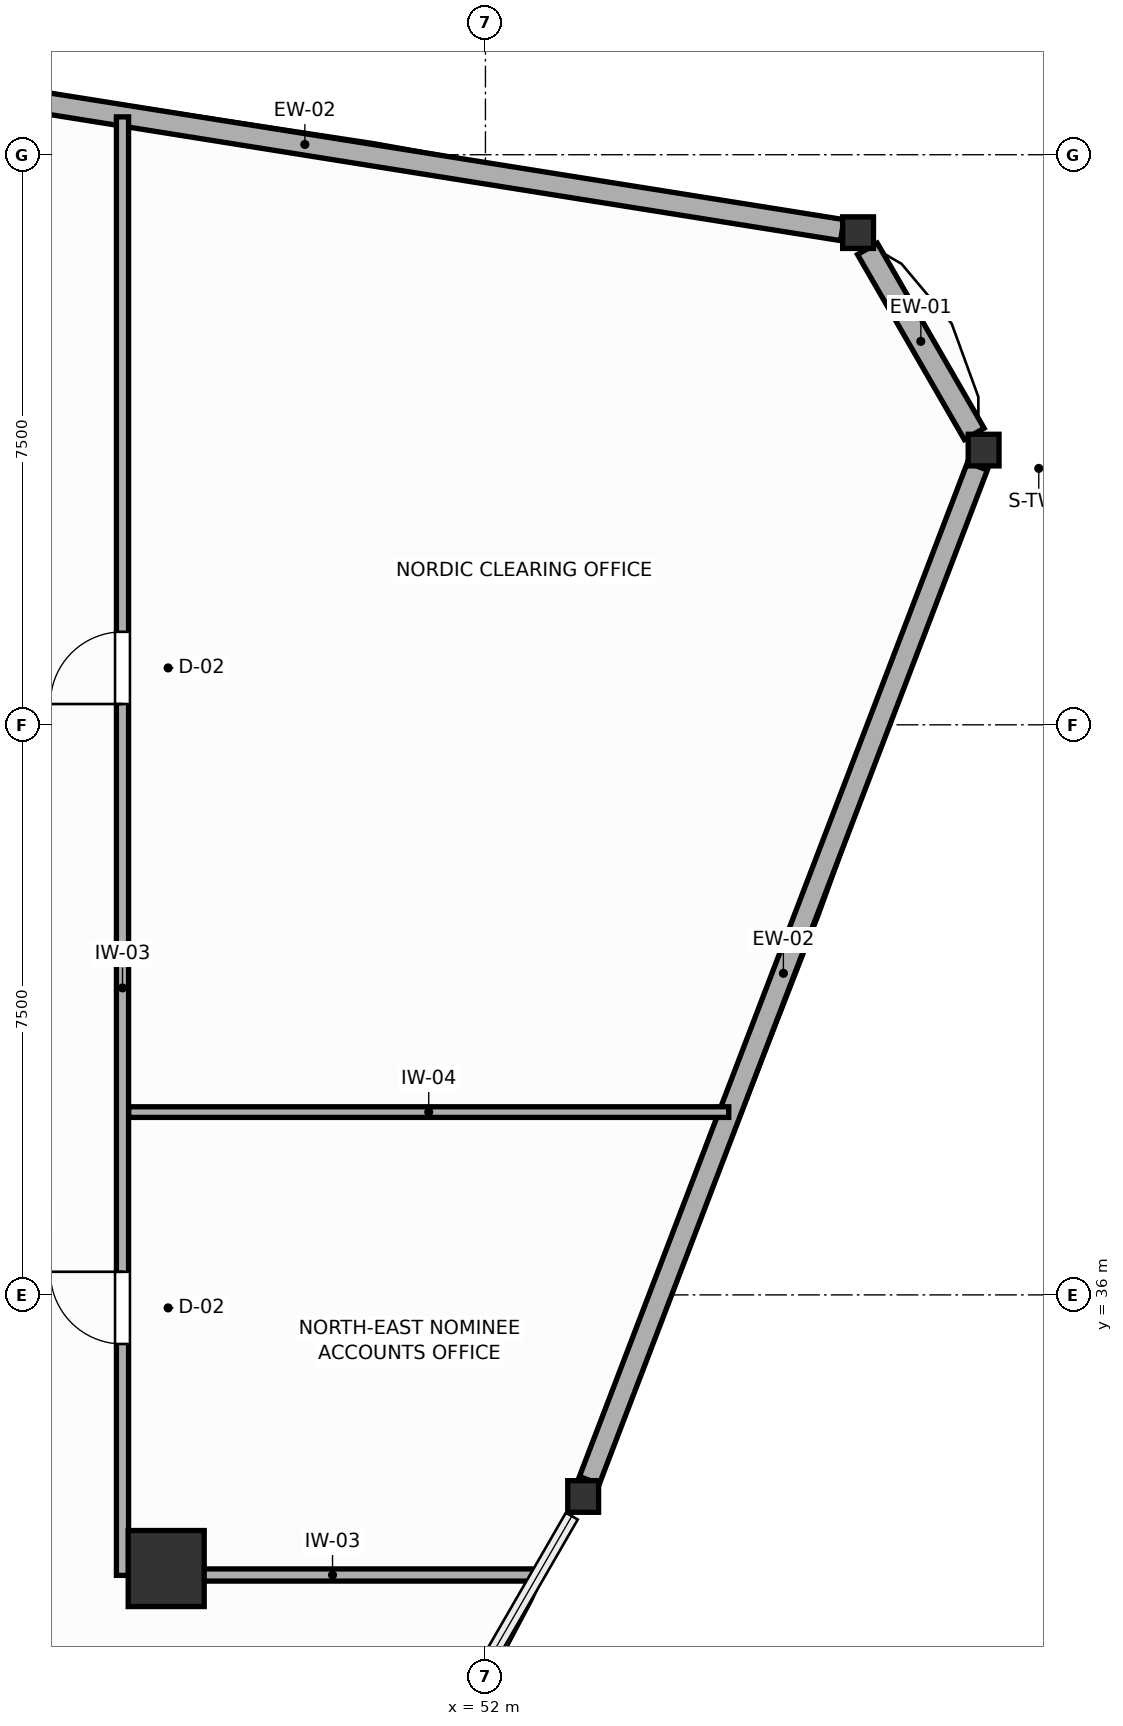
"""IFC4 building model, lengths in metres.
Left out: names, types, materials, properties, quantities, classifications, styles, units other than length and angle.
Written with IfcOpenShell. Run it as: python <this file> out.ifc"""

import sys

from ifc_helpers import new_model, si_unit, direction, frame, frame_2d, origin, origin_2d, place, context, subcontext, project, spatial, rectangle, i_section, extrude, source, transform, mapped, element, fill, save


model = new_model("IFC4")
c1 = context("Model", 3, precision=1e-05, world=origin(), true_north=direction((0.0, 1.0)))
c2 = subcontext(c1, "Body", "Model", "MODEL_VIEW")
j1 = project(units=[si_unit("LENGTHUNIT", "METRE"), si_unit("PLANEANGLEUNIT", "RADIAN")], contexts=[c1])
p1 = place(None, origin())
s1 = spatial("IfcSite", under=j1, at=p1, CompositionType="ELEMENT")
p2 = place(p1, origin())
s2 = spatial("IfcBuilding", under=s1, at=p2, CompositionType="ELEMENT")
p3 = place(p2, frame((0.0, 0.0, 175.8)))
s3 = spatial("IfcBuildingStorey", under=s2, at=p3, CompositionType="ELEMENT", Elevation=175.8)
m1 = source(origin(), c2, "Body", "SweptSolid", [
    extrude(rectangle(XDim=1.0, YDim=1.0, at=origin_2d()), origin(), (0.0, 0.0, 1.0), 3.6),
])
p4 = place(p3, frame((47.8, 32.4, 0.0), z_axis=(0.0, 0.0, 1.0), x_axis=(1.0, 0.0, 0.0)))
e1 = element("IfcColumn", 1, at=p4, inside=s3, PredefinedType="COLUMN", context=c2, shape_type="MappedRepresentation", body=[
    mapped(m1, transform((0.0, 0.0, 0.0), scale=1.0)),
])
m2 = source(origin(), c2, "Body", "SweptSolid", [
    extrude(i_section(OverallWidth=0.406, OverallDepth=0.416, WebThickness=0.027, FlangeThickness=0.044, FilletRadius=0.015, at=origin_2d()), origin(), (0.0, 0.0, 1.0), 3.6),
])
for number, where, z_axis, x_axis in (
    (2, (58.554, 47.115, 0.0), (0.0, 0.0, 1.0), (1.0, 0.0, 0.0)),
    (3, (56.902, 49.975, 0.0), (0.0, 0.0, 1.0), (1.0, 0.0, 0.0)),
    (4, (53.286, 33.348, 0.0), (0.0, 0.0, 1.0), (1.0, 0.0, 0.0)),
):
    element("IfcColumn", number, at=place(p3, frame(where, z_axis=z_axis, x_axis=x_axis)), inside=s3, PredefinedType="COLUMN", context=c2, shape_type="MappedRepresentation", body=[
        mapped(m2, transform((0.0, 0.0, 0.0), scale=1.0)),
    ])
p5 = place(p3, frame((58.431, 47.327, 0.0), z_axis=(0.0, 0.0, 1.0), x_axis=(-0.499978056798, 0.866038072327, 0.0)))
e5 = element("IfcWall", 5, at=p5, inside=s3, PredefinedType="SOLIDWALL", context=c2, shape_type="SweptSolid", body=[
    extrude(rectangle(XDim=2.811, YDim=0.3, at=frame_2d((1.406, 0.0))), origin(), (0.0, 0.0, 1.0), 1.87),
])
p6 = place(p3, frame((56.694, 50.008, 0.0), z_axis=(0.0, 0.0, 1.0), x_axis=(-0.987528363291, 0.157441200757, 0.0)))
e6 = element("IfcWall", 6, at=p6, inside=s3, PredefinedType="SOLIDWALL", context=c2, shape_type="SweptSolid", body=[
    extrude(rectangle(XDim=14.319, YDim=0.28, at=frame_2d((7.159, 0.0))), origin(), (0.0, 0.0, 1.0), 1.87),
])
p7 = place(p3, frame((53.367, 33.561, 0.0), z_axis=(0.0, 0.0, 1.0), x_axis=(0.357407179744, 0.933948664471, 0.0)))
e7 = element("IfcWall", 7, at=p7, inside=s3, PredefinedType="SOLIDWALL", context=c2, shape_type="SweptSolid", body=[
    extrude(rectangle(XDim=14.284, YDim=0.28, at=frame_2d((7.142, 0.0))), origin(), (0.0, 0.0, 1.0), 1.87),
])
p8 = place(p3, frame((47.225, 32.31, 0.0), z_axis=(0.0, 0.0, 1.0), x_axis=(0.0, 1.0, 0.0)))
e8 = element("IfcWall", 8, at=p8, inside=s3, PredefinedType="PARTITIONING", context=c2, shape_type="SweptSolid", body=[
    extrude(rectangle(XDim=19.188, YDim=0.16, at=frame_2d((9.594, 0.0))), origin(), (0.0, 0.0, 1.0), 3.4),
])
p9 = place(p8, frame((3.044, 0.0, 0.0)))
e9 = element("IfcOpeningElement", 9, at=p9, cuts=e8, PredefinedType="OPENING", context=c2, shape_type="SweptSolid", body=[
    extrude(rectangle(XDim=0.95, YDim=2.05, at=frame_2d((0.475, 1.025))), frame((0.0, 0.09, 0.0), z_axis=(0.0, -1.0, 0.0), x_axis=(1.0, 0.0, 0.0)), (0.0, 0.0, 1.0), 0.18),
])
p10 = place(p8, frame((11.463, 0.0, 0.0)))
e10 = element("IfcOpeningElement", 10, at=p10, cuts=e8, PredefinedType="OPENING", context=c2, shape_type="SweptSolid", body=[
    extrude(rectangle(XDim=0.95, YDim=2.05, at=frame_2d((0.475, 1.025))), frame((0.0, 0.09, 0.0), z_axis=(0.0, -1.0, 0.0), x_axis=(1.0, 0.0, 0.0)), (0.0, 0.0, 1.0), 0.18),
])
p11 = place(p3, frame((47.307, 32.315, 0.0), z_axis=(0.0, 0.0, 1.0), x_axis=(1.0, 0.0, 0.0)))
e11 = element("IfcWall", 11, at=p11, inside=s3, PredefinedType="PARTITIONING", context=c2, shape_type="SweptSolid", body=[
    extrude(rectangle(XDim=5.362, YDim=0.16, at=frame_2d((2.681, 0.0))), origin(), (0.0, 0.0, 1.0), 2.16),
])
p12 = place(p3, frame((47.307, 38.405, 0.0), z_axis=(0.0, 0.0, 1.0), x_axis=(1.0, 0.0, 0.0)))
e12 = element("IfcWall", 12, at=p12, inside=s3, PredefinedType="PARTITIONING", context=c2, shape_type="SweptSolid", body=[
    extrude(rectangle(XDim=7.894, YDim=0.14, at=frame_2d((3.947, 0.0))), origin(), (0.0, 0.0, 1.0), 3.4),
])
p13 = place(p9, origin())
e13 = element("IfcDoor", 13, at=p13, inside=s3, OperationType="SINGLE_SWING_RIGHT", PredefinedType="DOOR", context=c2, shape_type="SweptSolid", body=[
    extrude(rectangle(XDim=0.95, YDim=2.05, at=frame_2d((0.475, 1.025))), frame((0.0, 0.025, 0.0), z_axis=(0.0, -1.0, 0.0), x_axis=(1.0, 0.0, 0.0)), (0.0, 0.0, 1.0), 0.05),
])
fill(e9, e13)
p14 = place(p10, origin())
e14 = element("IfcDoor", 14, at=p14, inside=s3, OperationType="SINGLE_SWING_LEFT", PredefinedType="DOOR", context=c2, shape_type="SweptSolid", body=[
    extrude(rectangle(XDim=0.95, YDim=2.05, at=frame_2d((0.475, 1.025))), frame((0.0, 0.025, 0.0), z_axis=(0.0, -1.0, 0.0), x_axis=(1.0, 0.0, 0.0)), (0.0, 0.0, 1.0), 0.05),
])
fill(e10, e14)
save(model, sys.argv[1])
